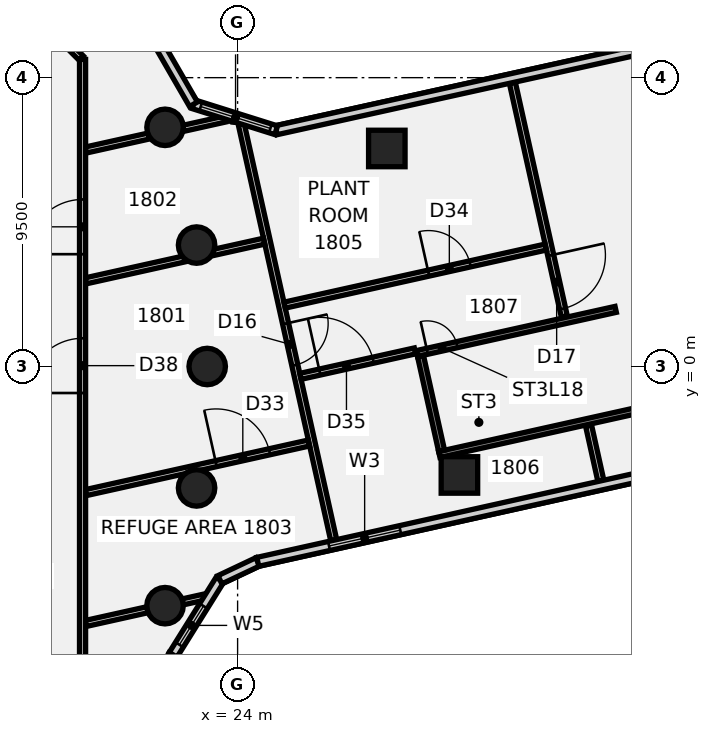
"""IFC4 building model, lengths in metres.
Left out: names, types, materials, properties, quantities, classifications, styles, units other than length and angle.
Written with IfcOpenShell. Run it as: python <this file> out.ifc"""

import sys

from ifc_helpers import new_model, si_unit, direction, frame, frame_2d, origin, origin_2d, place, context, subcontext, project, spatial, polyline, rectangle, circle, outline, extrude, element, fill, save


model = new_model("IFC4")
c1 = context("Model", 3, precision=1e-05, world=origin(), true_north=direction((0.0, 1.0)))
c2 = subcontext(c1, "Body", "Model", "MODEL_VIEW")
j1 = project(units=[si_unit("LENGTHUNIT", "METRE"), si_unit("PLANEANGLEUNIT", "RADIAN")], contexts=[c1])
p1 = place(None, origin())
s1 = spatial("IfcSite", under=j1, at=p1, CompositionType="ELEMENT")
p2 = place(p1, origin())
s2 = spatial("IfcBuilding", under=s1, at=p2, CompositionType="ELEMENT")
p3 = place(p2, frame((0.0, 0.0, 79.0)))
s3 = spatial("IfcBuildingStorey", under=s2, at=p3, CompositionType="ELEMENT", Elevation=79.0)
for number, where, z_axis, x_axis in (
    (1, (23.0, 0.0, -0.18), (0.0, 0.0, 1.0), (1.0, 0.0, 0.0)),
    (2, (22.651, 3.994, -0.18), (0.0, 0.0, 1.0), (1.0, 0.0, 0.0)),
    (3, (21.613, 7.866, -0.18), (0.0, 0.0, 1.0), (1.0, 0.0, 0.0)),
    (4, (21.613, -7.866, -0.18), (0.0, 0.0, 1.0), (1.0, 0.0, 0.0)),
    (5, (22.651, -3.994, -0.18), (0.0, 0.0, 1.0), (1.0, 0.0, 0.0)),
):
    element("IfcColumn", number, at=place(p3, frame(where, z_axis=z_axis, x_axis=x_axis)), inside=s3, PredefinedType="COLUMN", context=c2, shape_type="SweptSolid", body=[
        extrude(circle(Radius=0.6, at=origin_2d()), origin(), (0.0, 0.0, 1.0), 4.54),
    ])
p4 = place(p3, frame((37.693, 9.125, -0.173), z_axis=(-0.037120340526, 0.06251280535, 0.997353613061), x_axis=(0.215890896147, -0.973970607022, 0.069082397308)))
e6 = element("IfcColumn", 6, at=p4, inside=s3, PredefinedType="COLUMN", context=c2, shape_type="SweptSolid", body=[
    extrude(rectangle(XDim=1.2, YDim=1.2, at=origin_2d()), origin(), (0.0, 0.0, 1.0), 4.538),
])
p5 = place(p3, frame((28.908, 7.171, -0.175), z_axis=(-0.029020888191, 0.027459467491, 0.999201564097), x_axis=(0.21648201457, -0.975725272019, 0.033101826414)))
e7 = element("IfcColumn", 7, at=p5, inside=s3, PredefinedType="COLUMN", context=c2, shape_type="SweptSolid", body=[
    extrude(rectangle(XDim=1.2, YDim=1.2, at=origin_2d()), origin(), (0.0, 0.0, 1.0), 4.534),
])
p6 = place(p3, frame((31.296, -3.567, -0.175), z_axis=(0.013944362332, 0.037418269579, 0.999202395844), x_axis=(-0.975880776515, -0.21721764254, 0.021753293964)))
e8 = element("IfcColumn", 8, at=p6, inside=s3, PredefinedType="COLUMN", context=c2, shape_type="SweptSolid", body=[
    extrude(rectangle(XDim=1.2, YDim=1.2, at=origin_2d()), origin(), (0.0, 0.0, 1.0), 4.535),
])
p7 = place(p3, frame((24.12, 7.973, 0.0), z_axis=(0.0, 0.0, 1.0), x_axis=(0.216928614258, -0.976187469862, 0.0)))
e9 = element("IfcWall", 9, at=p7, inside=s3, PredefinedType="PARTITIONING", context=c2, shape_type="SweptSolid", body=[
    extrude(rectangle(XDim=14.022, YDim=0.2, at=frame_2d((7.011, 0.0))), origin(), (0.0, 0.0, 1.0), 3.66),
])
p8 = place(p7, frame((6.723, 0.0, 0.0)))
e10 = element("IfcOpeningElement", 10, at=p8, cuts=e9, PredefinedType="OPENING", context=c2, shape_type="SweptSolid", body=[
    extrude(rectangle(XDim=1.4, YDim=2.1, at=frame_2d((0.7, 1.05))), frame((0.0, 0.11, 0.0), z_axis=(0.0, -1.0, 0.0), x_axis=(1.0, 0.0, 0.0)), (0.0, 0.0, 1.0), 0.22),
])
p9 = place(p3, frame((33.037, 9.333, 0.0), z_axis=(0.0, 0.0, 1.0), x_axis=(0.217028940436, -0.976165169945, 0.0)))
e11 = element("IfcWall", 11, at=p9, inside=s3, PredefinedType="PARTITIONING", context=c2, shape_type="SweptSolid", body=[
    extrude(rectangle(XDim=7.875, YDim=0.2, at=frame_2d((3.937, 0.0))), origin(), (0.0, 0.0, 1.0), 3.66),
])
p10 = place(p9, frame((5.815, 0.0, 0.0)))
e12 = element("IfcOpeningElement", 12, at=p10, cuts=e11, PredefinedType="OPENING", context=c2, shape_type="SweptSolid", body=[
    extrude(rectangle(XDim=1.8, YDim=2.1, at=frame_2d((0.9, 1.05))), frame((0.0, 0.11, 0.0), z_axis=(0.0, -1.0, 0.0), x_axis=(1.0, 0.0, 0.0)), (0.0, 0.0, 1.0), 0.22),
])
p11 = place(p3, frame((35.545, -1.946, 0.0), z_axis=(0.0, 0.0, 1.0), x_axis=(0.216958268932, -0.976180879521, 0.0)))
e13 = element("IfcWall", 13, at=p11, inside=s3, PredefinedType="PARTITIONING", context=c2, shape_type="SweptSolid", body=[
    extrude(rectangle(XDim=1.859, YDim=0.2, at=frame_2d((0.929, 0.0))), origin(), (0.0, 0.0, 1.0), 3.66),
])
p12 = place(p3, frame((17.142, 11.858, 0.0), z_axis=(0.0, 0.0, 1.0), x_axis=(0.707106781187, -0.707106781187, 0.0)))
e14 = element("IfcWall", 14, at=p12, inside=s3, PredefinedType="PARTITIONING", context=c2, shape_type="SweptSolid", body=[
    extrude(rectangle(XDim=2.426, YDim=0.2, at=frame_2d((1.213, 0.0))), origin(), (0.0, 0.0, 1.0), 3.66),
])
p13 = place(p3, frame((19.002, -4.149, 0.0), z_axis=(0.0, 0.0, 1.0), x_axis=(0.976165670114, 0.217026690732, 0.0)))
e15 = element("IfcWall", 15, at=p13, inside=s3, PredefinedType="PARTITIONING", context=c2, shape_type="SweptSolid", body=[
    extrude(rectangle(XDim=7.521, YDim=0.2, at=frame_2d((3.761, 0.0))), origin(), (0.0, 0.0, 1.0), 3.66),
])
p14 = place(p13, frame((4.395, 0.0, 0.0)))
e16 = element("IfcOpeningElement", 16, at=p14, cuts=e15, PredefinedType="OPENING", context=c2, shape_type="SweptSolid", body=[
    extrude(rectangle(XDim=1.8, YDim=2.1, at=frame_2d((0.9, 1.05))), frame((0.0, 0.11, 0.0), z_axis=(0.0, -1.0, 0.0), x_axis=(1.0, 0.0, 0.0)), (0.0, 0.0, 1.0), 0.22),
])
p15 = place(p3, frame((19.002, 2.817, 0.0), z_axis=(0.0, 0.0, 1.0), x_axis=(0.9761664515, 0.217023176105, 0.0)))
e17 = element("IfcWall", 17, at=p15, inside=s3, PredefinedType="PARTITIONING", context=c2, shape_type="SweptSolid", body=[
    extrude(rectangle(XDim=3.346, YDim=0.2, at=frame_2d((1.673, 0.0))), origin(), (0.0, 0.0, 1.0), 3.66),
])
p16 = place(p3, frame((23.195, 3.749, 0.0), z_axis=(0.0, 0.0, 1.0), x_axis=(0.976143603736, 0.217125919423, 0.0)))
e18 = element("IfcWall", 18, at=p16, inside=s3, PredefinedType="PARTITIONING", context=c2, shape_type="SweptSolid", body=[
    extrude(rectangle(XDim=1.719, YDim=0.2, at=frame_2d((0.86, 0.0))), origin(), (0.0, 0.0, 1.0), 3.66),
])
p17 = place(p3, frame((19.002, 7.119, 0.0), z_axis=(0.0, 0.0, 1.0), x_axis=(0.97615465389, 0.217076234739, 0.0)))
e19 = element("IfcWall", 19, at=p17, inside=s3, PredefinedType="PARTITIONING", context=c2, shape_type="SweptSolid", body=[
    extrude(rectangle(XDim=2.128, YDim=0.2, at=frame_2d((1.064, 0.0))), origin(), (0.0, 0.0, 1.0), 3.66),
])
p18 = place(p3, frame((22.214, 7.833, 0.0), z_axis=(0.0, 0.0, 1.0), x_axis=(0.976142259417, 0.217131963057, 0.0)))
e20 = element("IfcWall", 20, at=p18, inside=s3, PredefinedType="PARTITIONING", context=c2, shape_type="SweptSolid", body=[
    extrude(rectangle(XDim=1.411, YDim=0.2, at=frame_2d((0.706, 0.0))), origin(), (0.0, 0.0, 1.0), 3.66),
])
p19 = place(p3, frame((19.002, -8.452, 0.0), z_axis=(0.0, 0.0, 1.0), x_axis=(0.976145732889, 0.217116347063, 0.0)))
e21 = element("IfcWall", 21, at=p19, inside=s3, PredefinedType="PARTITIONING", context=c2, shape_type="SweptSolid", body=[
    extrude(rectangle(XDim=2.086, YDim=0.2, at=frame_2d((1.043, 0.0))), origin(), (0.0, 0.0, 1.0), 3.66),
])
p20 = place(p3, frame((22.19, -7.743, 0.0), z_axis=(0.0, 0.0, 1.0), x_axis=(0.976097832704, 0.21733159225, 0.0)))
e22 = element("IfcWall", 22, at=p20, inside=s3, PredefinedType="PARTITIONING", context=c2, shape_type="SweptSolid", body=[
    extrude(rectangle(XDim=0.709, YDim=0.2, at=frame_2d((0.354, 0.0))), origin(), (0.0, 0.0, 1.0), 3.66),
])
p21 = place(p3, frame((25.547, 2.018, 0.0), z_axis=(0.0, 0.0, 1.0), x_axis=(0.976143956172, 0.217124334953, 0.0)))
e23 = element("IfcWall", 23, at=p21, inside=s3, PredefinedType="PARTITIONING", context=c2, shape_type="SweptSolid", body=[
    extrude(rectangle(XDim=8.8, YDim=0.2, at=frame_2d((4.4, 0.0))), origin(), (0.0, 0.0, 1.0), 3.66),
])
p22 = place(p21, frame((4.85, 0.0, 0.0)))
e24 = element("IfcOpeningElement", 24, at=p22, cuts=e23, PredefinedType="OPENING", context=c2, shape_type="SweptSolid", body=[
    extrude(rectangle(XDim=1.4, YDim=2.1, at=frame_2d((0.7, 1.05))), frame((0.0, 0.11, 0.0), z_axis=(0.0, -1.0, 0.0), x_axis=(1.0, 0.0, 0.0)), (0.0, 0.0, 1.0), 0.22),
])
p23 = place(p3, frame((26.068, -0.324, 0.0), z_axis=(0.0, 0.0, 1.0), x_axis=(0.976172172107, 0.216997443313, 0.0)))
e25 = element("IfcWall", 25, at=p23, inside=s3, PredefinedType="PARTITIONING", context=c2, shape_type="SweptSolid", body=[
    extrude(rectangle(XDim=3.859, YDim=0.2, at=frame_2d((1.93, 0.0))), origin(), (0.0, 0.0, 1.0), 3.66),
])
p24 = place(p23, frame((0.65, 0.0, 0.0)))
e26 = element("IfcOpeningElement", 26, at=p24, cuts=e25, PredefinedType="OPENING", context=c2, shape_type="SweptSolid", body=[
    extrude(rectangle(XDim=1.8, YDim=2.1, at=frame_2d((0.9, 1.05))), frame((0.0, 0.11, 0.0), z_axis=(0.0, -1.0, 0.0), x_axis=(1.0, 0.0, 0.0)), (0.0, 0.0, 1.0), 0.22),
])
p25 = place(p3, frame((18.9, -10.1, 0.0), z_axis=(0.0, 0.0, 1.0), x_axis=(0.0, 1.0, 0.0)))
e27 = element("IfcWall", 27, at=p25, inside=s3, PredefinedType="PARTITIONING", context=c2, shape_type="SweptSolid", body=[
    extrude(rectangle(XDim=20.2, YDim=0.2, at=frame_2d((10.1, 0.0))), origin(), (0.0, 0.0, 1.0), 3.66),
])
p26 = place(p25, frame((9.228, 0.0, 0.0)))
e28 = element("IfcOpeningElement", 28, at=p26, cuts=e27, PredefinedType="OPENING", context=c2, shape_type="SweptSolid", body=[
    extrude(rectangle(XDim=1.8, YDim=2.1, at=frame_2d((0.9, 1.05))), frame((0.0, 0.11, 0.0), z_axis=(0.0, -1.0, 0.0), x_axis=(1.0, 0.0, 0.0)), (0.0, 0.0, 1.0), 0.22),
])
p27 = place(p25, frame((13.794, 0.0, 0.0)))
e29 = element("IfcOpeningElement", 29, at=p27, cuts=e27, PredefinedType="OPENING", context=c2, shape_type="SweptSolid", body=[
    extrude(rectangle(XDim=1.8, YDim=2.1, at=frame_2d((0.9, 1.05))), frame((0.0, 0.11, 0.0), z_axis=(0.0, -1.0, 0.0), x_axis=(1.0, 0.0, 0.0)), (0.0, 0.0, 1.0), 0.22),
])
p28 = place(p3, frame((20.019, -12.956, 0.0), z_axis=(0.0, 0.0, 1.0), x_axis=(0.472144036007, 0.881521417359, 0.0)))
e30 = element("IfcWall", 30, at=p28, inside=s3, PredefinedType="SOLIDWALL", context=c2, shape_type="SweptSolid", body=[
    extrude(rectangle(XDim=3.94, YDim=0.3, at=frame_2d((1.97, 0.0))), origin(), (0.0, 0.0, 1.0), 4.36),
])
p29 = place(p3, frame((21.879, -9.483, 0.0), z_axis=(0.0, 0.0, 1.0), x_axis=(0.528957701174, 0.848648189987, 0.0)))
e31 = element("IfcWall", 31, at=p29, inside=s3, PredefinedType="SOLIDWALL", context=c2, shape_type="SweptSolid", body=[
    extrude(rectangle(XDim=2.91, YDim=0.3, at=frame_2d((1.455, 0.0))), origin(), (0.0, 0.0, 1.0), 4.36),
])
p30 = place(p29, frame((0.39, 0.0, 1.4)))
e32 = element("IfcOpeningElement", 32, at=p30, cuts=e31, PredefinedType="OPENING", context=c2, shape_type="SweptSolid", body=[
    extrude(rectangle(XDim=1.5, YDim=1.0, at=frame_2d((0.75, 0.5))), frame((0.0, 0.16, 0.0), z_axis=(0.0, -1.0, 0.0), x_axis=(1.0, 0.0, 0.0)), (0.0, 0.0, 1.0), 0.32),
])
p31 = place(p3, frame((23.418, -7.014, 0.0), z_axis=(0.0, 0.0, 1.0), x_axis=(0.904159344398, 0.427195365071, 0.0)))
e33 = element("IfcWall", 33, at=p31, inside=s3, PredefinedType="SOLIDWALL", context=c2, shape_type="SweptSolid", body=[
    extrude(rectangle(XDim=1.378, YDim=0.3, at=frame_2d((0.689, 0.0))), origin(), (0.0, 0.0, 1.0), 4.36),
])
p32 = place(p3, frame((24.665, -6.425, 0.0), z_axis=(0.0, 0.0, 1.0), x_axis=(0.976153387473, 0.217081929523, 0.0)))
e34 = element("IfcWall", 34, at=p32, inside=s3, PredefinedType="SOLIDWALL", context=c2, shape_type="SweptSolid", body=[
    extrude(rectangle(XDim=23.892, YDim=0.3, at=frame_2d((11.946, 0.0))), origin(), (0.0, 0.0, 1.0), 4.36),
])
p33 = place(p32, frame((2.4, 0.0, 1.4)))
e35 = element("IfcOpeningElement", 35, at=p33, cuts=e34, PredefinedType="OPENING", context=c2, shape_type="SweptSolid", body=[
    extrude(rectangle(XDim=2.4, YDim=2.1, at=frame_2d((1.2, 1.05))), frame((0.0, 0.16, 0.0), z_axis=(0.0, -1.0, 0.0), x_axis=(1.0, 0.0, 0.0)), (0.0, 0.0, 1.0), 0.32),
])
p34 = place(p3, frame((45.013, 12.135, 0.0), z_axis=(0.0, 0.0, 1.0), x_axis=(-0.976433864348, -0.215816840295, 0.0)))
e36 = element("IfcWall", 36, at=p34, inside=s3, PredefinedType="SOLIDWALL", context=c2, shape_type="SweptSolid", body=[
    extrude(rectangle(XDim=20.221, YDim=0.3, at=frame_2d((10.11, 0.0))), origin(), (0.0, 0.0, 1.0), 4.36),
])
p35 = place(p34, frame((5.7, 0.0, 1.4)))
e37 = element("IfcOpeningElement", 37, at=p35, cuts=e36, PredefinedType="OPENING", context=c2, shape_type="SweptSolid", body=[
    extrude(rectangle(XDim=2.4, YDim=2.1, at=frame_2d((1.2, 1.05))), frame((0.0, 0.16, 0.0), z_axis=(0.0, -1.0, 0.0), x_axis=(1.0, 0.0, 0.0)), (0.0, 0.0, 1.0), 0.32),
])
p36 = place(p3, frame((25.268, 7.771, 0.0), z_axis=(0.0, 0.0, 1.0), x_axis=(-0.954072095572, 0.299577096006, 0.0)))
e38 = element("IfcWall", 38, at=p36, inside=s3, PredefinedType="SOLIDWALL", context=c2, shape_type="SweptSolid", body=[
    extrude(rectangle(XDim=2.85, YDim=0.3, at=frame_2d((1.425, 0.0))), origin(), (0.0, 0.0, 1.0), 4.36),
])
p37 = place(p36, frame((0.2, 0.0, 1.4)))
e39 = element("IfcOpeningElement", 39, at=p37, cuts=e38, PredefinedType="OPENING", context=c2, shape_type="SweptSolid", body=[
    extrude(rectangle(XDim=2.4, YDim=2.1, at=frame_2d((1.2, 1.05))), frame((0.0, 0.16, 0.0), z_axis=(0.0, -1.0, 0.0), x_axis=(1.0, 0.0, 0.0)), (0.0, 0.0, 1.0), 0.32),
])
p38 = place(p3, frame((22.549, 8.625, 0.0), z_axis=(0.0, 0.0, 1.0), x_axis=(-0.500322641095, 0.86583904671, 0.0)))
e40 = element("IfcWall", 40, at=p38, inside=s3, PredefinedType="SOLIDWALL", context=c2, shape_type="SweptSolid", body=[
    extrude(rectangle(XDim=3.251, YDim=0.3, at=frame_2d((1.625, 0.0))), origin(), (0.0, 0.0, 1.0), 4.36),
])
p39 = place(p3, frame((29.896, 0.424, -0.18), z_axis=(0.0, 0.0, 1.0), x_axis=(0.97615532549, 0.217073214646, 0.0)))
e41 = element("IfcWall", 41, at=p39, inside=s3, PredefinedType="SHEAR", context=c2, shape_type="SweptSolid", body=[
    extrude(rectangle(XDim=6.7, YDim=0.2, at=frame_2d((3.35, 0.0))), origin(), (0.0, 0.0, 1.0), 3.94),
])
p40 = place(p39, frame((0.35, 0.0, 0.0)))
e42 = element("IfcOpeningElement", 42, at=p40, cuts=e41, PredefinedType="OPENING", context=c2, shape_type="SweptSolid", body=[
    extrude(rectangle(XDim=1.0, YDim=2.1, at=frame_2d((0.5, 1.05))), frame((0.0, 0.11, 0.0), z_axis=(0.0, -1.0, 0.0), x_axis=(1.0, 0.0, 0.0)), (0.0, 0.0, 1.0), 0.22),
])
p41 = place(p3, frame((30.634, -2.895, -0.18), z_axis=(0.0, 0.0, 1.0), x_axis=(0.976149320922, 0.217100214792, 0.0)))
e43 = element("IfcWall", 43, at=p41, inside=s3, PredefinedType="SHEAR", context=c2, shape_type="SweptSolid", body=[
    extrude(rectangle(XDim=6.7, YDim=0.2, at=frame_2d((3.35, 0.0))), origin(), (0.0, 0.0, 1.0), 3.94),
])
p42 = place(p3, frame((30.71, -2.775, -0.18), z_axis=(0.0, 0.0, 1.0), x_axis=(-0.217124322557, 0.976143958929, 0.0)))
e44 = element("IfcWall", 44, at=p42, inside=s3, PredefinedType="SHEAR", context=c2, shape_type="SweptSolid", body=[
    extrude(rectangle(XDim=3.2, YDim=0.2, at=frame_2d((1.6, 0.0))), origin(), (0.0, 0.0, 1.0), 3.94),
])
p43 = place(p3, frame((0.0, 0.0, -0.18)))
e45 = element("IfcWall", 45, at=p43, inside=s3, PredefinedType="SHEAR", context=c2, shape_type="SweptSolid", body=[
    extrude(outline(polyline([(36.958, -1.386), (37.153, -1.343), (36.458, 1.781), (36.263, 1.738), (36.958, -1.386)])), origin(), (0.0, 0.0, 1.0), 3.94),
])
p44 = place(p8, frame((1.4, 0.0, 0.0), z_axis=(0.0, 0.0, 1.0), x_axis=(-1.0, 0.0, 0.0)))
e46 = element("IfcDoor", 46, at=p44, inside=s3, OperationType="DOUBLE_DOOR_SINGLE_SWING", PredefinedType="DOOR", context=c2, shape_type="SweptSolid", body=[
    extrude(rectangle(XDim=1.4, YDim=2.1, at=frame_2d((0.7, 1.05))), frame((0.0, 0.025, 0.0), z_axis=(0.0, -1.0, 0.0), x_axis=(1.0, 0.0, 0.0)), (0.0, 0.0, 1.0), 0.05),
])
fill(e10, e46)
p45 = place(p10, origin())
e47 = element("IfcDoor", 47, at=p45, inside=s3, OperationType="DOUBLE_DOOR_SINGLE_SWING", PredefinedType="DOOR", context=c2, shape_type="SweptSolid", body=[
    extrude(rectangle(XDim=1.8, YDim=2.1, at=frame_2d((0.9, 1.05))), frame((0.0, 0.025, 0.0), z_axis=(0.0, -1.0, 0.0), x_axis=(1.0, 0.0, 0.0)), (0.0, 0.0, 1.0), 0.05),
])
fill(e12, e47)
p46 = place(p14, frame((1.8, 0.0, 0.0), z_axis=(0.0, 0.0, 1.0), x_axis=(-1.0, 0.0, 0.0)))
e48 = element("IfcDoor", 48, at=p46, inside=s3, OperationType="DOUBLE_DOOR_SINGLE_SWING", PredefinedType="DOOR", context=c2, shape_type="SweptSolid", body=[
    extrude(rectangle(XDim=1.8, YDim=2.1, at=frame_2d((0.9, 1.05))), frame((0.0, 0.025, 0.0), z_axis=(0.0, -1.0, 0.0), x_axis=(1.0, 0.0, 0.0)), (0.0, 0.0, 1.0), 0.05),
])
fill(e16, e48)
p47 = place(p22, origin())
e49 = element("IfcDoor", 49, at=p47, inside=s3, OperationType="DOUBLE_DOOR_SINGLE_SWING", PredefinedType="DOOR", context=c2, shape_type="SweptSolid", body=[
    extrude(rectangle(XDim=1.4, YDim=2.1, at=frame_2d((0.7, 1.05))), frame((0.0, 0.025, 0.0), z_axis=(0.0, -1.0, 0.0), x_axis=(1.0, 0.0, 0.0)), (0.0, 0.0, 1.0), 0.05),
])
fill(e24, e49)
p48 = place(p24, frame((1.8, 0.0, 0.0), z_axis=(0.0, 0.0, 1.0), x_axis=(-1.0, 0.0, 0.0)))
e50 = element("IfcDoor", 50, at=p48, inside=s3, OperationType="DOUBLE_DOOR_SINGLE_SWING", PredefinedType="DOOR", context=c2, shape_type="SweptSolid", body=[
    extrude(rectangle(XDim=1.8, YDim=2.1, at=frame_2d((0.9, 1.05))), frame((0.0, 0.025, 0.0), z_axis=(0.0, -1.0, 0.0), x_axis=(1.0, 0.0, 0.0)), (0.0, 0.0, 1.0), 0.05),
])
fill(e26, e50)
p49 = place(p26, origin())
e51 = element("IfcDoor", 51, at=p49, inside=s3, OperationType="DOUBLE_DOOR_SINGLE_SWING", PredefinedType="DOOR", context=c2, shape_type="SweptSolid", body=[
    extrude(rectangle(XDim=1.8, YDim=2.1, at=frame_2d((0.9, 1.05))), frame((0.0, 0.025, 0.0), z_axis=(0.0, -1.0, 0.0), x_axis=(1.0, 0.0, 0.0)), (0.0, 0.0, 1.0), 0.05),
])
fill(e28, e51)
p50 = place(p27, frame((1.8, 0.0, 0.0), z_axis=(0.0, 0.0, 1.0), x_axis=(-1.0, 0.0, 0.0)))
e52 = element("IfcDoor", 52, at=p50, inside=s3, OperationType="DOUBLE_DOOR_SINGLE_SWING", PredefinedType="DOOR", context=c2, shape_type="SweptSolid", body=[
    extrude(rectangle(XDim=1.8, YDim=2.1, at=frame_2d((0.9, 1.05))), frame((0.0, 0.025, 0.0), z_axis=(0.0, -1.0, 0.0), x_axis=(1.0, 0.0, 0.0)), (0.0, 0.0, 1.0), 0.05),
])
fill(e29, e52)
p51 = place(p30, origin())
e53 = element("IfcWindow", 53, at=p51, inside=s3, PartitioningType="SINGLE_PANEL", PredefinedType="WINDOW", context=c2, shape_type="SweptSolid", body=[
    extrude(rectangle(XDim=1.5, YDim=1.0, at=frame_2d((0.75, 0.5))), frame((0.0, 0.03, 0.0), z_axis=(0.0, -1.0, 0.0), x_axis=(1.0, 0.0, 0.0)), (0.0, 0.0, 1.0), 0.06),
])
fill(e32, e53)
p52 = place(p33, origin())
e54 = element("IfcWindow", 54, at=p52, inside=s3, PartitioningType="SINGLE_PANEL", PredefinedType="WINDOW", context=c2, shape_type="SweptSolid", body=[
    extrude(rectangle(XDim=2.4, YDim=2.1, at=frame_2d((1.2, 1.05))), frame((0.0, 0.03, 0.0), z_axis=(0.0, -1.0, 0.0), x_axis=(1.0, 0.0, 0.0)), (0.0, 0.0, 1.0), 0.06),
])
fill(e35, e54)
p53 = place(p37, origin())
e55 = element("IfcWindow", 55, at=p53, inside=s3, PartitioningType="SINGLE_PANEL", PredefinedType="WINDOW", context=c2, shape_type="SweptSolid", body=[
    extrude(rectangle(XDim=2.4, YDim=2.1, at=frame_2d((1.2, 1.05))), frame((0.0, 0.03, 0.0), z_axis=(0.0, -1.0, 0.0), x_axis=(1.0, 0.0, 0.0)), (0.0, 0.0, 1.0), 0.06),
])
fill(e39, e55)
p54 = place(p40, origin())
e56 = element("IfcDoor", 56, at=p54, inside=s3, OperationType="SINGLE_SWING_LEFT", PredefinedType="DOOR", context=c2, shape_type="SweptSolid", body=[
    extrude(rectangle(XDim=1.0, YDim=2.1, at=frame_2d((0.5, 1.05))), frame((0.0, 0.025, 0.0), z_axis=(0.0, -1.0, 0.0), x_axis=(1.0, 0.0, 0.0)), (0.0, 0.0, 1.0), 0.05),
])
fill(e42, e56)
save(model, sys.argv[1])
